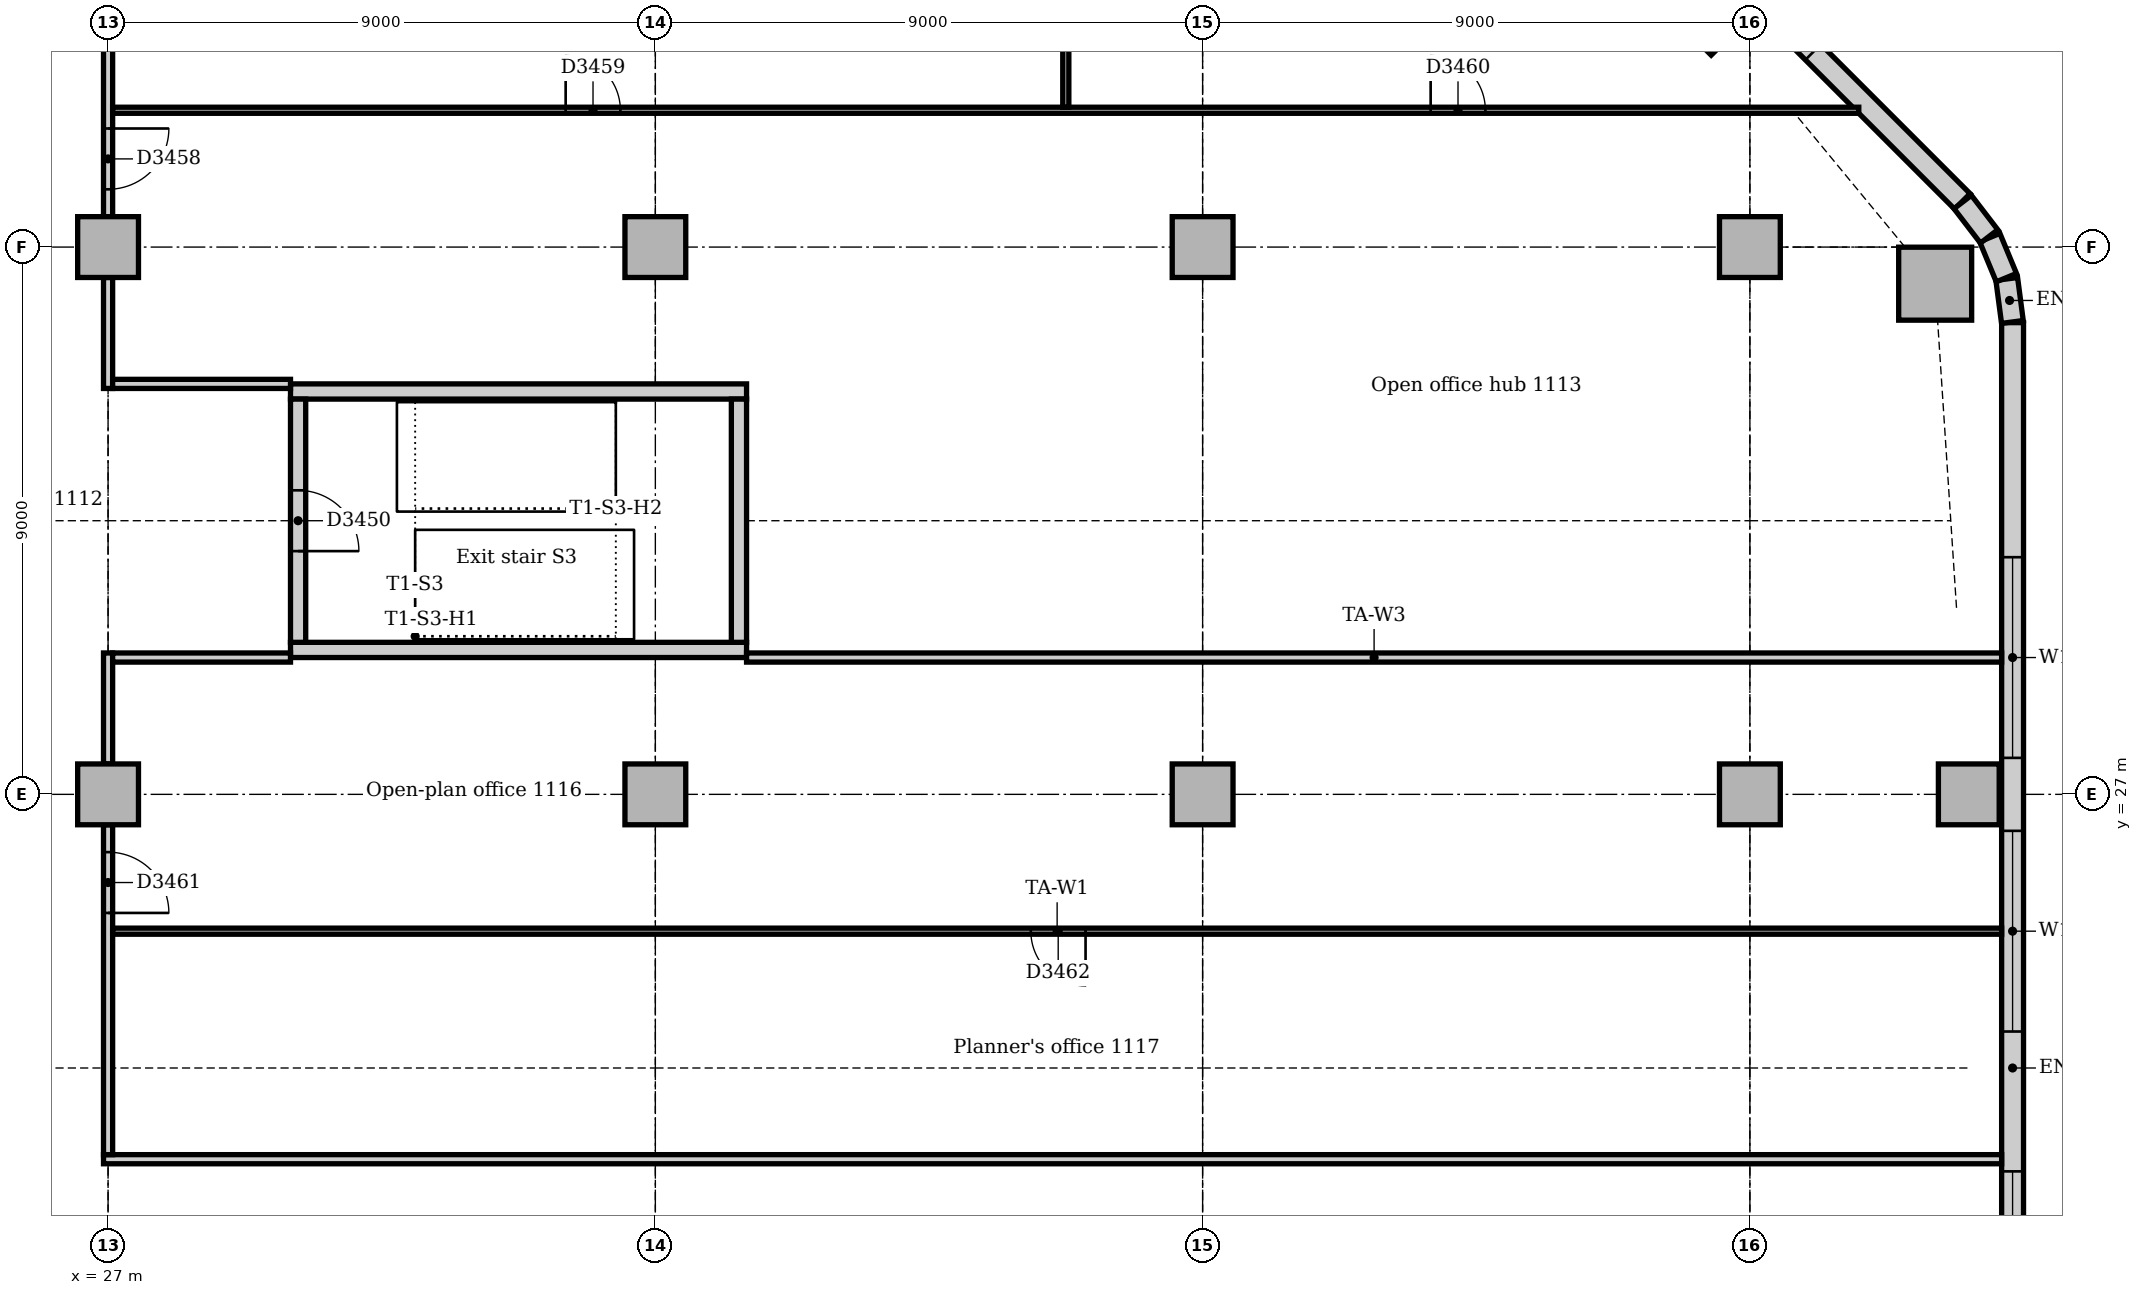
"""IFC4 building model, lengths in metres.
Left out: names, types, materials, properties, quantities, classifications, styles, units other than length and angle.
Written with IfcOpenShell. Run it as: python <this file> out.ifc"""

import sys

from ifc_helpers import new_model, si_unit, direction, frame, frame_2d, origin, origin_2d, place, context, subcontext, project, spatial, rectangle, extrude, element, fill, save


model = new_model("IFC4")
c1 = context("Model", 3, precision=1e-05, world=origin(), true_north=direction((0.0, 1.0)))
c2 = subcontext(c1, "Body", "Model", "MODEL_VIEW")
j1 = project(units=[si_unit("LENGTHUNIT", "METRE"), si_unit("PLANEANGLEUNIT", "RADIAN")], contexts=[c1])
p1 = place(None, origin())
s1 = spatial("IfcSite", under=j1, at=p1, CompositionType="ELEMENT")
p2 = place(p1, origin())
s2 = spatial("IfcBuilding", under=s1, at=p2, CompositionType="ELEMENT")
p3 = place(p2, frame((0.0, 0.0, 51.0)))
s3 = spatial("IfcBuildingStorey", under=s2, at=p3, CompositionType="ELEMENT", Elevation=51.0)
for number, where, z_axis, x_axis in (
    (1, (30.0, 29.375, 0.0), (0.0, 0.0, 1.0), (1.0, 0.0, 0.0)),
    (2, (37.5, 33.625, 0.0), (0.0, 0.0, 1.0), (-1.0, 0.0, 0.0)),
):
    element("IfcWall", number, at=place(p3, frame(where, z_axis=z_axis, x_axis=x_axis)), inside=s3, PredefinedType="SOLIDWALL", context=c2, shape_type="SweptSolid", body=[
        extrude(rectangle(XDim=7.5, YDim=0.25, at=frame_2d((3.75, 0.0))), origin(), (0.0, 0.0, 1.0), 4.0),
    ])
p4 = place(p3, frame((37.375, 29.5, 0.0), z_axis=(0.0, 0.0, 1.0), x_axis=(0.0, 1.0, 0.0)))
e3 = element("IfcWall", 3, at=p4, inside=s3, PredefinedType="SOLIDWALL", context=c2, shape_type="SweptSolid", body=[
    extrude(rectangle(XDim=4.0, YDim=0.25, at=frame_2d((2.0, 0.0))), origin(), (0.0, 0.0, 1.0), 4.0),
])
p5 = place(p3, frame((30.125, 33.5, 0.0), z_axis=(0.0, 0.0, 1.0), x_axis=(0.0, -1.0, 0.0)))
e4 = element("IfcWall", 4, at=p5, inside=s3, PredefinedType="SOLIDWALL", context=c2, shape_type="SweptSolid", body=[
    extrude(rectangle(XDim=4.0, YDim=0.25, at=frame_2d((2.0, 0.0))), origin(), (0.0, 0.0, 1.0), 4.0),
])
p6 = place(p5, frame((1.5, 0.0, 0.0)))
e5 = element("IfcOpeningElement", 5, at=p6, cuts=e4, PredefinedType="OPENING", context=c2, shape_type="SweptSolid", body=[
    extrude(rectangle(XDim=1.0, YDim=2.1, at=frame_2d((0.5, 1.05))), frame((0.0, 0.135, 0.0), z_axis=(0.0, -1.0, 0.0), x_axis=(1.0, 0.0, 0.0)), (0.0, 0.0, 1.0), 0.27),
])
p7 = place(p3, frame((57.047, 35.398, 0.0), z_axis=(0.0, 0.0, 1.0), x_axis=(1.0, 0.0, 0.0)))
e6 = element("IfcColumn", 6, at=p7, inside=s3, PredefinedType="COLUMN", context=c2, shape_type="SweptSolid", body=[
    extrude(rectangle(XDim=1.2, YDim=1.2, at=origin_2d()), origin(), (0.0, 0.0, 1.0), 3.85),
])
for number, where, z_axis, x_axis in (
    (7, (57.6, 27.0, 0.0), (0.0, 0.0, 1.0), (1.0, 0.0, 0.0)),
    (8, (53.364, 39.864, 0.0), (0.0, 0.0, 1.0), (0.707, 0.707, 0.0)),
    (9, (27.0, 27.0, 0.0), (0.0, 0.0, 1.0), (1.0, 0.0, 0.0)),
    (10, (27.0, 36.0, 0.0), (0.0, 0.0, 1.0), (1.0, 0.0, 0.0)),
    (11, (36.0, 27.0, 0.0), (0.0, 0.0, 1.0), (1.0, 0.0, 0.0)),
    (12, (36.0, 36.0, 0.0), (0.0, 0.0, 1.0), (1.0, 0.0, 0.0)),
    (13, (45.0, 27.0, 0.0), (0.0, 0.0, 1.0), (1.0, 0.0, 0.0)),
    (14, (45.0, 36.0, 0.0), (0.0, 0.0, 1.0), (1.0, 0.0, 0.0)),
    (15, (54.0, 27.0, 0.0), (0.0, 0.0, 1.0), (1.0, 0.0, 0.0)),
    (16, (54.0, 36.0, 0.0), (0.0, 0.0, 1.0), (1.0, 0.0, 0.0)),
):
    element("IfcColumn", number, at=place(p3, frame(where, z_axis=z_axis, x_axis=x_axis)), inside=s3, PredefinedType="COLUMN", context=c2, shape_type="SweptSolid", body=[
        extrude(rectangle(XDim=1.0, YDim=1.0, at=origin_2d()), origin(), (0.0, 0.0, 1.0), 3.85),
    ])
p8 = place(p3, frame((58.32, 10.243, 0.0), z_axis=(0.0, 0.0, 1.0), x_axis=(0.0, 1.0, 0.0)))
e17 = element("IfcWall", 17, at=p8, inside=s3, PredefinedType="STANDARD", context=c2, shape_type="SweptSolid", body=[
    extrude(rectangle(XDim=24.515, YDim=0.36, at=frame_2d((12.257, 0.0))), origin(), (0.0, 0.0, 1.0), 3.85),
])
p9 = place(p8, frame((3.857, 0.0, 0.9)))
e18 = element("IfcOpeningElement", 18, at=p9, cuts=e17, PredefinedType="OPENING", context=c2, shape_type="SweptSolid", body=[
    extrude(rectangle(XDim=3.3, YDim=1.6, at=frame_2d((1.65, 0.8))), frame((0.0, 0.19, 0.0), z_axis=(0.0, -1.0, 0.0), x_axis=(1.0, 0.0, 0.0)), (0.0, 0.0, 1.0), 0.38),
])
p10 = place(p8, frame((8.757, 0.0, 0.9)))
e19 = element("IfcOpeningElement", 19, at=p10, cuts=e17, PredefinedType="OPENING", context=c2, shape_type="SweptSolid", body=[
    extrude(rectangle(XDim=1.8, YDim=1.6, at=frame_2d((0.9, 0.8))), frame((0.0, 0.19, 0.0), z_axis=(0.0, -1.0, 0.0), x_axis=(1.0, 0.0, 0.0)), (0.0, 0.0, 1.0), 0.38),
])
p11 = place(p8, frame((12.857, 0.0, 0.9)))
e20 = element("IfcOpeningElement", 20, at=p11, cuts=e17, PredefinedType="OPENING", context=c2, shape_type="SweptSolid", body=[
    extrude(rectangle(XDim=3.3, YDim=1.6, at=frame_2d((1.65, 0.8))), frame((0.0, 0.19, 0.0), z_axis=(0.0, -1.0, 0.0), x_axis=(1.0, 0.0, 0.0)), (0.0, 0.0, 1.0), 0.38),
])
p12 = place(p8, frame((17.357, 0.0, 0.9)))
e21 = element("IfcOpeningElement", 21, at=p12, cuts=e17, PredefinedType="OPENING", context=c2, shape_type="SweptSolid", body=[
    extrude(rectangle(XDim=3.3, YDim=1.6, at=frame_2d((1.65, 0.8))), frame((0.0, 0.19, 0.0), z_axis=(0.0, -1.0, 0.0), x_axis=(1.0, 0.0, 0.0)), (0.0, 0.0, 1.0), 0.38),
])
p13 = place(p3, frame((57.494, 36.751, 0.0), z_axis=(0.0, 0.0, 1.0), x_axis=(-0.707106781187, 0.707106781187, 0.0)))
e22 = element("IfcWall", 22, at=p13, inside=s3, PredefinedType="STANDARD", context=c2, shape_type="SweptSolid", body=[
    extrude(rectangle(XDim=10.243, YDim=0.36, at=frame_2d((5.121, 0.0))), origin(), (0.0, 0.0, 1.0), 3.85),
])
p14 = place(p13, frame((3.471, 0.0, 0.9)))
e23 = element("IfcOpeningElement", 23, at=p14, cuts=e22, PredefinedType="OPENING", context=c2, shape_type="SweptSolid", body=[
    extrude(rectangle(XDim=3.3, YDim=1.6, at=frame_2d((1.65, 0.8))), frame((0.0, 0.19, 0.0), z_axis=(0.0, -1.0, 0.0), x_axis=(1.0, 0.0, 0.0)), (0.0, 0.0, 1.0), 0.38),
])
for number, where, z_axis, x_axis in (
    (24, (58.317, 34.769, 0.0), (0.0, 0.0, 1.0), (-0.131, 0.991, 0.0)),
    (25, (58.218, 35.497, 0.0), (0.0, 0.0, 1.0), (-0.383, 0.924, 0.0)),
):
    element("IfcWall", number, at=place(p3, frame(where, z_axis=z_axis, x_axis=x_axis)), inside=s3, PredefinedType="STANDARD", context=c2, shape_type="SweptSolid", body=[
        extrude(rectangle(XDim=0.713, YDim=0.36, at=frame_2d((0.356, 0.0))), origin(), (0.0, 0.0, 1.0), 3.85),
    ])
p15 = place(p3, frame((57.934, 36.175, 0.0), z_axis=(0.0, 0.0, 1.0), x_axis=(-0.608802368033, 0.793321924995, 0.0)))
e26 = element("IfcWall", 26, at=p15, inside=s3, PredefinedType="STANDARD", context=c2, shape_type="SweptSolid", body=[
    extrude(rectangle(XDim=0.713, YDim=0.36, at=frame_2d((0.357, 0.0))), origin(), (0.0, 0.0, 1.0), 3.85),
])
p16 = place(p3, frame((26.925, 21.0, 0.0), z_axis=(0.0, 0.0, 1.0), x_axis=(1.0, 0.0, 0.0)))
e27 = element("IfcWall", 27, at=p16, inside=s3, PredefinedType="PARTITIONING", context=c2, shape_type="SweptSolid", body=[
    extrude(rectangle(XDim=31.215, YDim=0.15, at=frame_2d((15.607, 0.0))), origin(), (0.0, 0.0, 1.0), 3.85),
])
p17 = place(p3, frame((27.0, 33.675, 0.0), z_axis=(0.0, 0.0, 1.0), x_axis=(0.0, 1.0, 0.0)))
e28 = element("IfcWall", 28, at=p17, inside=s3, PredefinedType="PARTITIONING", context=c2, shape_type="SweptSolid", body=[
    extrude(rectangle(XDim=1.825, YDim=0.15, at=frame_2d((0.912, 0.0))), origin(), (0.0, 0.0, 1.0), 3.158),
])
p18 = place(p3, frame((27.0, 36.5, 0.0), z_axis=(0.0, 0.0, 1.0), x_axis=(0.0, 1.0, 0.0)))
e29 = element("IfcWall", 29, at=p18, inside=s3, PredefinedType="PARTITIONING", context=c2, shape_type="SweptSolid", body=[
    extrude(rectangle(XDim=7.1, YDim=0.15, at=frame_2d((3.55, 0.0))), origin(), (0.0, 0.0, 1.0), 3.158),
])
p19 = place(p18, frame((0.45, 0.0, 0.0)))
e30 = element("IfcOpeningElement", 30, at=p19, cuts=e29, PredefinedType="OPENING", context=c2, shape_type="SweptSolid", body=[
    extrude(rectangle(XDim=1.0, YDim=2.1, at=frame_2d((0.5, 1.05))), frame((0.0, 0.085, 0.0), z_axis=(0.0, -1.0, 0.0), x_axis=(1.0, 0.0, 0.0)), (0.0, 0.0, 1.0), 0.17),
])
p20 = place(p3, frame((27.0, 21.075, 0.0), z_axis=(0.0, 0.0, 1.0), x_axis=(0.0, 1.0, 0.0)))
e31 = element("IfcWall", 31, at=p20, inside=s3, PredefinedType="PARTITIONING", context=c2, shape_type="SweptSolid", body=[
    extrude(rectangle(XDim=5.425, YDim=0.15, at=frame_2d((2.712, 0.0))), origin(), (0.0, 0.0, 1.0), 3.158),
])
p21 = place(p20, frame((3.975, 0.0, 0.0)))
e32 = element("IfcOpeningElement", 32, at=p21, cuts=e31, PredefinedType="OPENING", context=c2, shape_type="SweptSolid", body=[
    extrude(rectangle(XDim=1.0, YDim=2.1, at=frame_2d((0.5, 1.05))), frame((0.0, 0.085, 0.0), z_axis=(0.0, -1.0, 0.0), x_axis=(1.0, 0.0, 0.0)), (0.0, 0.0, 1.0), 0.17),
])
p22 = place(p3, frame((27.0, 27.5, 0.0), z_axis=(0.0, 0.0, 1.0), x_axis=(0.0, 1.0, 0.0)))
e33 = element("IfcWall", 33, at=p22, inside=s3, PredefinedType="PARTITIONING", context=c2, shape_type="SweptSolid", body=[
    extrude(rectangle(XDim=1.825, YDim=0.15, at=frame_2d((0.912, 0.0))), origin(), (0.0, 0.0, 1.0), 3.158),
])
for number, where, z_axis, x_axis in (
    (34, (27.075, 29.25, 0.0), (0.0, 0.0, 1.0), (1.0, 0.0, 0.0)),
    (35, (27.075, 33.75, 0.0), (0.0, 0.0, 1.0), (1.0, 0.0, 0.0)),
):
    element("IfcWall", number, at=place(p3, frame(where, z_axis=z_axis, x_axis=x_axis)), inside=s3, PredefinedType="PARTITIONING", context=c2, shape_type="SweptSolid", body=[
        extrude(rectangle(XDim=2.925, YDim=0.15, at=frame_2d((1.462, 0.0))), origin(), (0.0, 0.0, 1.0), 3.85),
    ])
p23 = place(p3, frame((37.5, 29.25, 0.0), z_axis=(0.0, 0.0, 1.0), x_axis=(1.0, 0.0, 0.0)))
e36 = element("IfcWall", 36, at=p23, inside=s3, PredefinedType="PARTITIONING", context=c2, shape_type="SweptSolid", body=[
    extrude(rectangle(XDim=20.64, YDim=0.15, at=frame_2d((10.32, 0.0))), origin(), (0.0, 0.0, 1.0), 3.85),
])
p24 = place(p3, frame((27.075, 24.75, 0.0), z_axis=(0.0, 0.0, 1.0), x_axis=(1.0, 0.0, 0.0)))
e37 = element("IfcWall", 37, at=p24, inside=s3, PredefinedType="PARTITIONING", context=c2, shape_type="SweptSolid", body=[
    extrude(rectangle(XDim=31.065, YDim=0.1, at=frame_2d((15.533, 0.0))), origin(), (0.0, 0.0, 1.0), 3.85),
])
p25 = place(p24, frame((15.1, 0.0, 0.0)))
e38 = element("IfcOpeningElement", 38, at=p25, cuts=e37, PredefinedType="OPENING", context=c2, shape_type="SweptSolid", body=[
    extrude(rectangle(XDim=0.9, YDim=2.1, at=frame_2d((0.45, 1.05))), frame((0.0, 0.06, 0.0), z_axis=(0.0, -1.0, 0.0), x_axis=(1.0, 0.0, 0.0)), (0.0, 0.0, 1.0), 0.12),
])
p26 = place(p3, frame((27.075, 38.25, 0.0), z_axis=(0.0, 0.0, 1.0), x_axis=(1.0, 0.0, 0.0)))
e39 = element("IfcWall", 39, at=p26, inside=s3, PredefinedType="PARTITIONING", context=c2, shape_type="SweptSolid", body=[
    extrude(rectangle(XDim=28.716, YDim=0.1, at=frame_2d((14.358, 0.0))), origin(), (0.0, 0.0, 1.0), 3.85),
])
p27 = place(p26, frame((7.45, 0.0, 0.0)))
e40 = element("IfcOpeningElement", 40, at=p27, cuts=e39, PredefinedType="OPENING", context=c2, shape_type="SweptSolid", body=[
    extrude(rectangle(XDim=0.9, YDim=2.1, at=frame_2d((0.45, 1.05))), frame((0.0, 0.06, 0.0), z_axis=(0.0, -1.0, 0.0), x_axis=(1.0, 0.0, 0.0)), (0.0, 0.0, 1.0), 0.12),
])
p28 = place(p26, frame((21.675, 0.0, 0.0)))
e41 = element("IfcOpeningElement", 41, at=p28, cuts=e39, PredefinedType="OPENING", context=c2, shape_type="SweptSolid", body=[
    extrude(rectangle(XDim=0.9, YDim=2.1, at=frame_2d((0.45, 1.05))), frame((0.0, 0.06, 0.0), z_axis=(0.0, -1.0, 0.0), x_axis=(1.0, 0.0, 0.0)), (0.0, 0.0, 1.0), 0.12),
])
p29 = place(p3, frame((42.75, 38.3, 0.0), z_axis=(0.0, 0.0, 1.0), x_axis=(0.0, 1.0, 0.0)))
e42 = element("IfcWall", 42, at=p29, inside=s3, PredefinedType="PARTITIONING", context=c2, shape_type="SweptSolid", body=[
    extrude(rectangle(XDim=6.34, YDim=0.1, at=frame_2d((3.17, 0.0))), origin(), (0.0, 0.0, 1.0), 3.85),
])
p30 = place(p10, origin())
e43 = element("IfcWindow", 43, at=p30, inside=s3, PartitioningType="SINGLE_PANEL", PredefinedType="WINDOW", context=c2, shape_type="SweptSolid", body=[
    extrude(rectangle(XDim=1.8, YDim=1.6, at=frame_2d((0.9, 0.8))), frame((0.0, 0.13, 0.0), z_axis=(0.0, -1.0, 0.0), x_axis=(1.0, 0.0, 0.0)), (0.0, 0.0, 1.0), 0.06),
])
fill(e19, e43)
p31 = place(p11, origin())
e44 = element("IfcWindow", 44, at=p31, inside=s3, PartitioningType="SINGLE_PANEL", PredefinedType="WINDOW", context=c2, shape_type="SweptSolid", body=[
    extrude(rectangle(XDim=3.3, YDim=1.6, at=frame_2d((1.65, 0.8))), frame((0.0, 0.13, 0.0), z_axis=(0.0, -1.0, 0.0), x_axis=(1.0, 0.0, 0.0)), (0.0, 0.0, 1.0), 0.06),
])
fill(e20, e44)
p32 = place(p12, origin())
e45 = element("IfcWindow", 45, at=p32, inside=s3, PartitioningType="SINGLE_PANEL", PredefinedType="WINDOW", context=c2, shape_type="SweptSolid", body=[
    extrude(rectangle(XDim=3.3, YDim=1.6, at=frame_2d((1.65, 0.8))), frame((0.0, 0.13, 0.0), z_axis=(0.0, -1.0, 0.0), x_axis=(1.0, 0.0, 0.0)), (0.0, 0.0, 1.0), 0.06),
])
fill(e21, e45)
p33 = place(p14, origin())
e46 = element("IfcWindow", 46, at=p33, inside=s3, PartitioningType="SINGLE_PANEL", PredefinedType="WINDOW", context=c2, shape_type="SweptSolid", body=[
    extrude(rectangle(XDim=3.3, YDim=1.6, at=frame_2d((1.65, 0.8))), frame((0.0, 0.13, 0.0), z_axis=(0.0, -1.0, 0.0), x_axis=(1.0, 0.0, 0.0)), (0.0, 0.0, 1.0), 0.06),
])
fill(e23, e46)
p34 = place(p6, origin())
e47 = element("IfcDoor", 47, at=p34, inside=s3, OperationType="SINGLE_SWING_RIGHT", PredefinedType="DOOR", context=c2, shape_type="SweptSolid", body=[
    extrude(rectangle(XDim=1.0, YDim=2.1, at=frame_2d((0.5, 1.05))), frame((0.0, 0.025, 0.0), z_axis=(0.0, -1.0, 0.0), x_axis=(1.0, 0.0, 0.0)), (0.0, 0.0, 1.0), 0.05),
])
fill(e5, e47)
p35 = place(p19, frame((1.0, 0.0, 0.0), z_axis=(0.0, 0.0, 1.0), x_axis=(-1.0, 0.0, 0.0)))
e48 = element("IfcDoor", 48, at=p35, inside=s3, OperationType="SINGLE_SWING_LEFT", PredefinedType="DOOR", context=c2, shape_type="SweptSolid", body=[
    extrude(rectangle(XDim=1.0, YDim=2.1, at=frame_2d((0.5, 1.05))), frame((0.0, 0.025, 0.0), z_axis=(0.0, -1.0, 0.0), x_axis=(1.0, 0.0, 0.0)), (0.0, 0.0, 1.0), 0.05),
])
fill(e30, e48)
p36 = place(p27, origin())
e49 = element("IfcDoor", 49, at=p36, inside=s3, OperationType="SINGLE_SWING_LEFT", PredefinedType="DOOR", context=c2, shape_type="SweptSolid", body=[
    extrude(rectangle(XDim=0.9, YDim=2.1, at=frame_2d((0.45, 1.05))), frame((0.0, 0.025, 0.0), z_axis=(0.0, -1.0, 0.0), x_axis=(1.0, 0.0, 0.0)), (0.0, 0.0, 1.0), 0.05),
])
fill(e40, e49)
p37 = place(p28, origin())
e50 = element("IfcDoor", 50, at=p37, inside=s3, OperationType="SINGLE_SWING_LEFT", PredefinedType="DOOR", context=c2, shape_type="SweptSolid", body=[
    extrude(rectangle(XDim=0.9, YDim=2.1, at=frame_2d((0.45, 1.05))), frame((0.0, 0.025, 0.0), z_axis=(0.0, -1.0, 0.0), x_axis=(1.0, 0.0, 0.0)), (0.0, 0.0, 1.0), 0.05),
])
fill(e41, e50)
p38 = place(p21, frame((1.0, 0.0, 0.0), z_axis=(0.0, 0.0, 1.0), x_axis=(-1.0, 0.0, 0.0)))
e51 = element("IfcDoor", 51, at=p38, inside=s3, OperationType="SINGLE_SWING_RIGHT", PredefinedType="DOOR", context=c2, shape_type="SweptSolid", body=[
    extrude(rectangle(XDim=1.0, YDim=2.1, at=frame_2d((0.5, 1.05))), frame((0.0, 0.025, 0.0), z_axis=(0.0, -1.0, 0.0), x_axis=(1.0, 0.0, 0.0)), (0.0, 0.0, 1.0), 0.05),
])
fill(e32, e51)
p39 = place(p25, frame((0.9, 0.0, 0.0), z_axis=(0.0, 0.0, 1.0), x_axis=(-1.0, 0.0, 0.0)))
e52 = element("IfcDoor", 52, at=p39, inside=s3, OperationType="SINGLE_SWING_LEFT", PredefinedType="DOOR", context=c2, shape_type="SweptSolid", body=[
    extrude(rectangle(XDim=0.9, YDim=2.1, at=frame_2d((0.45, 1.05))), frame((0.0, 0.025, 0.0), z_axis=(0.0, -1.0, 0.0), x_axis=(1.0, 0.0, 0.0)), (0.0, 0.0, 1.0), 0.05),
])
fill(e38, e52)
save(model, sys.argv[1])
